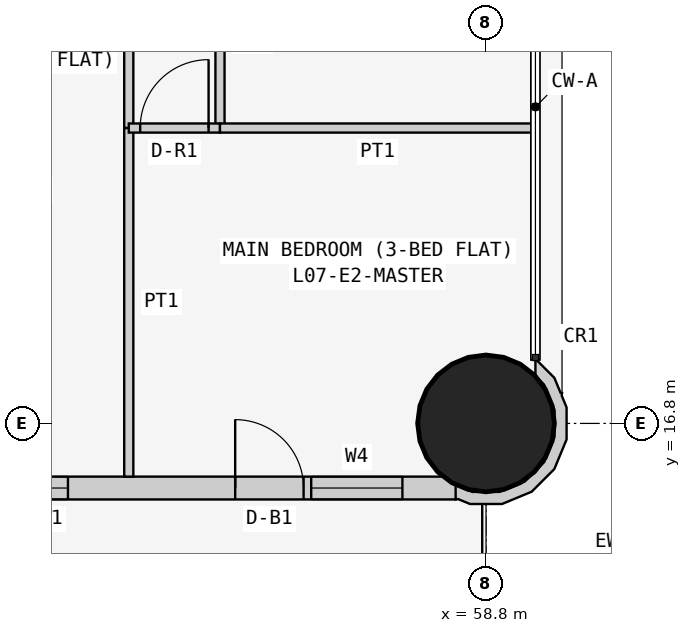
"""IFC4 building model, lengths in metres.
Left out: names, types, materials, properties, quantities, classifications, styles, units other than length and angle.
Written with IfcOpenShell. Run it as: python <this file> out.ifc"""

import sys

from ifc_helpers import new_model, si_unit, direction, frame, frame_2d, origin, origin_2d, place, context, subcontext, project, spatial, polyline, rectangle, circle, outline, extrude, element, fill, save


model = new_model("IFC4")
c1 = context("Model", 3, precision=1e-05, world=origin(), true_north=direction((0.0, 1.0)))
c2 = subcontext(c1, "Body", "Model", "MODEL_VIEW")
j1 = project(units=[si_unit("LENGTHUNIT", "METRE"), si_unit("PLANEANGLEUNIT", "RADIAN")], contexts=[c1])
p1 = place(None, origin())
s1 = spatial("IfcSite", under=j1, at=p1, CompositionType="ELEMENT")
p2 = place(p1, origin())
s2 = spatial("IfcBuilding", under=s1, at=p2, CompositionType="ELEMENT")
p3 = place(p2, frame((0.0, 0.0, 34.5)))
s3 = spatial("IfcBuildingStorey", under=s2, at=p3, CompositionType="ELEMENT", Elevation=34.5)
p4 = place(p3, frame((58.8, 16.8, 0.0), z_axis=(0.0, 0.0, 1.0), x_axis=(1.0, 0.0, 0.0)))
e1 = element("IfcColumn", 1, at=p4, inside=s3, PredefinedType="COLUMN", context=c2, shape_type="SweptSolid", body=[
    extrude(circle(Radius=0.9, at=origin_2d()), origin(), (0.0, 0.0, 1.0), 3.6),
])
p5 = place(p3, frame((43.0, 15.95, 0.0), z_axis=(0.0, 0.0, 1.0), x_axis=(1.0, 0.0, 0.0)))
e2 = element("IfcWall", 2, at=p5, inside=s3, PredefinedType="SOLIDWALL", context=c2, shape_type="SweptSolid", body=[
    extrude(rectangle(XDim=15.4, YDim=0.3, at=frame_2d((7.7, 0.0))), origin(), (0.0, 0.0, 1.0), 3.45),
])
p6 = place(p5, frame((1.2, 0.0, 0.9)))
e3 = element("IfcOpeningElement", 3, at=p6, cuts=e2, PredefinedType="OPENING", context=c2, shape_type="SweptSolid", body=[
    extrude(rectangle(XDim=1.8, YDim=1.5, at=frame_2d((0.9, 0.75))), frame((0.0, 0.16, 0.0), z_axis=(0.0, -1.0, 0.0), x_axis=(1.0, 0.0, 0.0)), (0.0, 0.0, 1.0), 0.32),
])
p7 = place(p5, frame((4.95, 0.0, 1.5)))
e4 = element("IfcOpeningElement", 4, at=p7, cuts=e2, PredefinedType="OPENING", context=c2, shape_type="SweptSolid", body=[
    extrude(rectangle(XDim=0.9, YDim=0.7, at=frame_2d((0.45, 0.35))), frame((0.0, 0.16, 0.0), z_axis=(0.0, -1.0, 0.0), x_axis=(1.0, 0.0, 0.0)), (0.0, 0.0, 1.0), 0.32),
])
p8 = place(p5, frame((8.5, 0.0, 0.9)))
e5 = element("IfcOpeningElement", 5, at=p8, cuts=e2, PredefinedType="OPENING", context=c2, shape_type="SweptSolid", body=[
    extrude(rectangle(XDim=1.8, YDim=1.5, at=frame_2d((0.9, 0.75))), frame((0.0, 0.16, 0.0), z_axis=(0.0, -1.0, 0.0), x_axis=(1.0, 0.0, 0.0)), (0.0, 0.0, 1.0), 0.32),
])
p9 = place(p5, frame((12.5, 0.0, 0.0)))
e6 = element("IfcOpeningElement", 6, at=p9, cuts=e2, PredefinedType="OPENING", context=c2, shape_type="SweptSolid", body=[
    extrude(rectangle(XDim=0.9, YDim=2.4, at=frame_2d((0.45, 1.2))), frame((0.0, 0.16, 0.0), z_axis=(0.0, -1.0, 0.0), x_axis=(1.0, 0.0, 0.0)), (0.0, 0.0, 1.0), 0.32),
])
p10 = place(p5, frame((13.5, 0.0, 0.9)))
e7 = element("IfcOpeningElement", 7, at=p10, cuts=e2, PredefinedType="OPENING", context=c2, shape_type="SweptSolid", body=[
    extrude(rectangle(XDim=1.2, YDim=1.5, at=frame_2d((0.6, 0.75))), frame((0.0, 0.16, 0.0), z_axis=(0.0, -1.0, 0.0), x_axis=(1.0, 0.0, 0.0)), (0.0, 0.0, 1.0), 0.32),
])
p11 = place(p3, frame((58.436, 15.89, 0.0), z_axis=(0.0, 0.0, 1.0), x_axis=(0.926129809145, -0.377204953059, 0.0)))
e8 = element("IfcWall", 8, at=p11, inside=s3, PredefinedType="SOLIDWALL", context=c2, shape_type="SweptSolid", body=[
    extrude(outline(polyline([(0.769, 1.728), (0.75, 1.723), (0.6, 1.875), (0.295, 2.004), (0.281, 1.998), (0.36, 1.803), (0.509, 1.741), (0.761, 1.486), (0.896, 1.154), (0.894, 0.795), (0.755, 0.465), (0.5, 0.213), (0.168, 0.078), (-0.1, 0.08), (0.0, -0.097), (0.03, -0.08), (0.198, -0.081), (0.589, 0.078), (0.889, 0.374), (1.052, 0.763), (1.055, 1.185), (0.896, 1.575), (0.778, 1.695), (0.769, 1.728)])), origin(), (0.0, 0.0, 1.0), 3.45),
])
p12 = place(p3, frame((54.1, 22.971, 0.0), z_axis=(0.0, 0.0, 1.0), x_axis=(0.0, -1.0, 0.0)))
e9 = element("IfcWall", 9, at=p12, inside=s3, PredefinedType="PARTITIONING", context=c2, shape_type="SweptSolid", body=[
    extrude(rectangle(XDim=2.285, YDim=0.12, at=frame_2d((1.143, 0.0))), origin(), (0.0, 0.0, 1.0), 3.45),
])
p13 = place(p3, frame((54.1, 20.686, 0.0), z_axis=(0.0, 0.0, 1.0), x_axis=(0.0, -1.0, 0.0)))
e10 = element("IfcWall", 10, at=p13, inside=s3, PredefinedType="PARTITIONING", context=c2, shape_type="SweptSolid", body=[
    extrude(rectangle(XDim=4.586, YDim=0.12, at=frame_2d((2.293, 0.0))), origin(), (0.0, 0.0, 1.0), 3.45),
])
p14 = place(p3, frame((55.3, 22.971, 0.0), z_axis=(0.0, 0.0, 1.0), x_axis=(0.0, -1.0, 0.0)))
e11 = element("IfcWall", 11, at=p14, inside=s3, PredefinedType="PARTITIONING", context=c2, shape_type="SweptSolid", body=[
    extrude(rectangle(XDim=2.285, YDim=0.12, at=frame_2d((1.143, 0.0))), origin(), (0.0, 0.0, 1.0), 3.45),
])
p15 = place(p3, frame((55.3, 20.686, 0.0), z_axis=(0.0, 0.0, 1.0), x_axis=(-1.0, 0.0, 0.0)))
e12 = element("IfcWall", 12, at=p15, inside=s3, PredefinedType="PARTITIONING", context=c2, shape_type="SweptSolid", body=[
    extrude(rectangle(XDim=1.2, YDim=0.12, at=frame_2d((0.6, 0.0))), origin(), (0.0, 0.0, 1.0), 3.45),
])
p16 = place(p15, frame((0.15, 0.0, 0.0)))
e13 = element("IfcOpeningElement", 13, at=p16, cuts=e12, PredefinedType="OPENING", context=c2, shape_type="SweptSolid", body=[
    extrude(rectangle(XDim=0.9, YDim=2.1, at=frame_2d((0.45, 1.05))), frame((0.0, 0.07, 0.0), z_axis=(0.0, -1.0, 0.0), x_axis=(1.0, 0.0, 0.0)), (0.0, 0.0, 1.0), 0.14),
])
p17 = place(p3, frame((59.45, 20.686, 0.0), z_axis=(0.0, 0.0, 1.0), x_axis=(-1.0, 0.0, 0.0)))
e14 = element("IfcWall", 14, at=p17, inside=s3, PredefinedType="PARTITIONING", context=c2, shape_type="SweptSolid", body=[
    extrude(rectangle(XDim=4.15, YDim=0.12, at=frame_2d((2.075, 0.0))), origin(), (0.0, 0.0, 1.0), 3.45),
])
p18 = place(p8, origin())
e15 = element("IfcWindow", 15, at=p18, inside=s3, PartitioningType="SINGLE_PANEL", PredefinedType="WINDOW", context=c2, shape_type="SweptSolid", body=[
    extrude(rectangle(XDim=1.8, YDim=1.5, at=frame_2d((0.9, 0.75))), frame((0.0, 0.03, 0.0), z_axis=(0.0, -1.0, 0.0), x_axis=(1.0, 0.0, 0.0)), (0.0, 0.0, 1.0), 0.06),
])
fill(e5, e15)
p19 = place(p9, origin())
e16 = element("IfcDoor", 16, at=p19, inside=s3, OperationType="SINGLE_SWING_LEFT", PredefinedType="DOOR", context=c2, shape_type="SweptSolid", body=[
    extrude(rectangle(XDim=0.9, YDim=2.4, at=frame_2d((0.45, 1.2))), frame((0.0, 0.025, 0.0), z_axis=(0.0, -1.0, 0.0), x_axis=(1.0, 0.0, 0.0)), (0.0, 0.0, 1.0), 0.05),
])
fill(e6, e16)
p20 = place(p10, origin())
e17 = element("IfcWindow", 17, at=p20, inside=s3, PartitioningType="SINGLE_PANEL", PredefinedType="WINDOW", context=c2, shape_type="SweptSolid", body=[
    extrude(rectangle(XDim=1.2, YDim=1.5, at=frame_2d((0.6, 0.75))), frame((0.0, 0.03, 0.0), z_axis=(0.0, -1.0, 0.0), x_axis=(1.0, 0.0, 0.0)), (0.0, 0.0, 1.0), 0.06),
])
fill(e7, e17)
p21 = place(p16, frame((0.9, 0.0, 0.0), z_axis=(0.0, 0.0, 1.0), x_axis=(-1.0, 0.0, 0.0)))
e18 = element("IfcDoor", 18, at=p21, inside=s3, OperationType="SINGLE_SWING_RIGHT", PredefinedType="DOOR", context=c2, shape_type="SweptSolid", body=[
    extrude(rectangle(XDim=0.9, YDim=2.1, at=frame_2d((0.45, 1.05))), frame((0.0, 0.025, 0.0), z_axis=(0.0, -1.0, 0.0), x_axis=(1.0, 0.0, 0.0)), (0.0, 0.0, 1.0), 0.05),
])
fill(e13, e18)
save(model, sys.argv[1])
